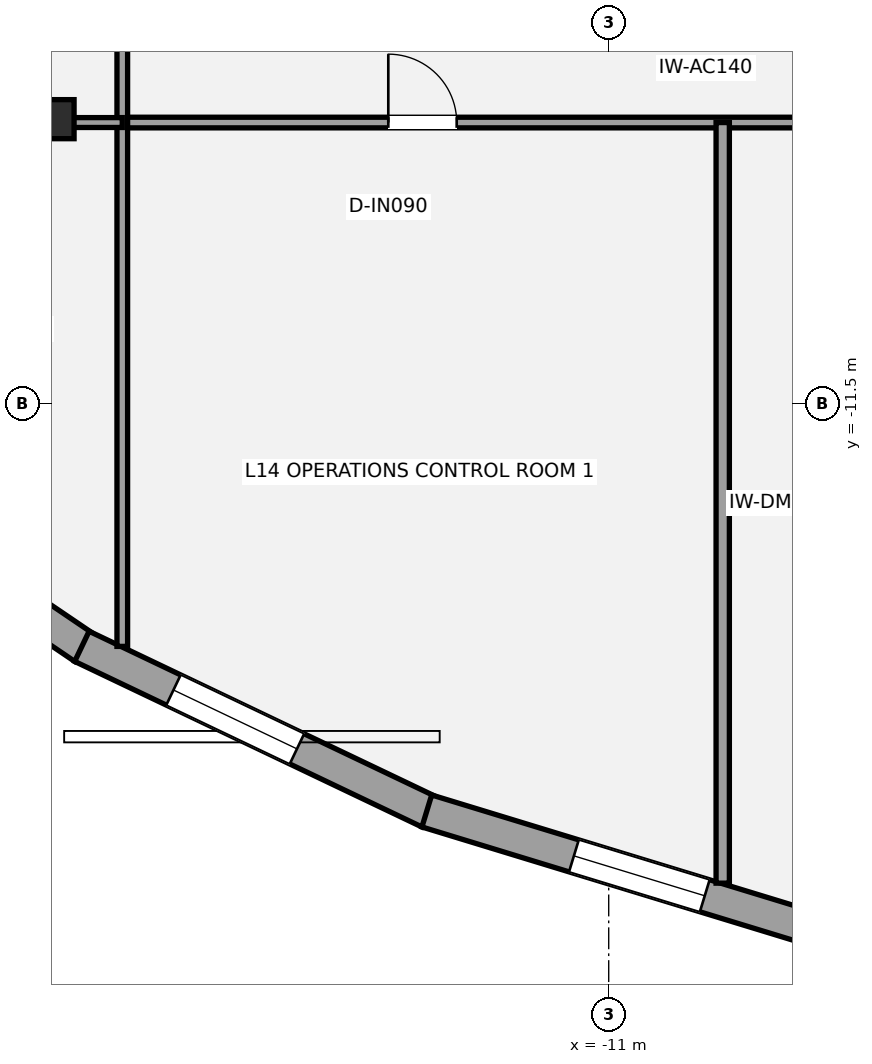
"""IFC4 building model, lengths in metres.
Left out: names, types, materials, properties, quantities, classifications, styles, units other than length and angle.
Written with IfcOpenShell. Run it as: python <this file> out.ifc"""

import sys

from ifc_helpers import new_model, si_unit, direction, frame, frame_2d, origin, origin_2d, place, context, subcontext, project, spatial, rectangle, i_section, extrude, element, fill, save


model = new_model("IFC4")
c1 = context("Model", 3, precision=1e-05, world=origin(), true_north=direction((0.0, 1.0)))
c2 = subcontext(c1, "Body", "Model", "MODEL_VIEW")
j1 = project(units=[si_unit("LENGTHUNIT", "METRE"), si_unit("PLANEANGLEUNIT", "RADIAN")], contexts=[c1])
p1 = place(None, origin())
s1 = spatial("IfcSite", under=j1, at=p1, CompositionType="ELEMENT")
p2 = place(p1, origin())
s2 = spatial("IfcBuilding", under=s1, at=p2, CompositionType="ELEMENT")
p3 = place(p2, frame((0.0, 0.0, 55.8)))
s3 = spatial("IfcBuildingStorey", under=s2, at=p3, CompositionType="ELEMENT", Elevation=55.8)
p4 = place(p3, frame((-18.253, -7.756, 0.0), z_axis=(0.0, 0.0, 1.0), x_axis=(1.0, 0.0, 0.0)))
e1 = element("IfcColumn", 1, at=p4, inside=s3, PredefinedType="COLUMN", context=c2, shape_type="SweptSolid", body=[
    extrude(i_section(OverallWidth=0.437, OverallDepth=0.514, WebThickness=0.061, FlangeThickness=0.097, at=origin_2d()), origin(), (0.0, 0.0, 1.0), 3.6),
])
p5 = place(p3, frame((-17.903, -14.708, 0.0), z_axis=(0.0, 0.0, 1.0), x_axis=(-0.827723442454, 0.561136260468, 0.0)))
e2 = element("IfcWall", 2, at=p5, inside=s3, PredefinedType="STANDARD", context=c2, shape_type="SweptSolid", body=[
    extrude(rectangle(XDim=4.759, YDim=0.44, at=frame_2d((2.379, 0.0))), origin(), (0.0, 0.0, 1.0), 2.529),
])
p6 = place(p5, frame((1.086, 0.0, 0.65)))
e3 = element("IfcOpeningElement", 3, at=p6, cuts=e2, PredefinedType="OPENING", context=c2, shape_type="SweptSolid", body=[
    extrude(rectangle(XDim=1.8, YDim=1.7, at=frame_2d((0.9, 0.85))), frame((0.0, 0.23, 0.0), z_axis=(0.0, -1.0, 0.0), x_axis=(1.0, 0.0, 0.0)), (0.0, 0.0, 1.0), 0.46),
])
p7 = place(p3, frame((-13.363, -16.869, 0.0), z_axis=(0.0, 0.0, 1.0), x_axis=(-0.902682101727, 0.430308056189, 0.0)))
e4 = element("IfcWall", 4, at=p7, inside=s3, PredefinedType="STANDARD", context=c2, shape_type="SweptSolid", body=[
    extrude(rectangle(XDim=5.061, YDim=0.44, at=frame_2d((2.53, 0.0))), origin(), (0.0, 0.0, 1.0), 2.529),
])
p8 = place(p7, frame((1.927, 0.0, 0.65)))
e5 = element("IfcOpeningElement", 5, at=p8, cuts=e4, PredefinedType="OPENING", context=c2, shape_type="SweptSolid", body=[
    extrude(rectangle(XDim=1.8, YDim=1.7, at=frame_2d((0.9, 0.85))), frame((0.0, 0.23, 0.0), z_axis=(0.0, -1.0, 0.0), x_axis=(1.0, 0.0, 0.0)), (0.0, 0.0, 1.0), 0.46),
])
p9 = place(p3, frame((-8.272, -18.42, 0.0), z_axis=(0.0, 0.0, 1.0), x_axis=(-0.956466543593, 0.291841996615, 0.0)))
e6 = element("IfcWall", 6, at=p9, inside=s3, PredefinedType="STANDARD", context=c2, shape_type="SweptSolid", body=[
    extrude(rectangle(XDim=5.354, YDim=0.44, at=frame_2d((2.677, 0.0))), origin(), (0.0, 0.0, 1.0), 2.529),
])
p10 = place(p9, frame((1.531, 0.0, 0.65)))
e7 = element("IfcOpeningElement", 7, at=p10, cuts=e6, PredefinedType="OPENING", context=c2, shape_type="SweptSolid", body=[
    extrude(rectangle(XDim=1.8, YDim=1.7, at=frame_2d((0.9, 0.85))), frame((0.0, 0.23, 0.0), z_axis=(0.0, -1.0, 0.0), x_axis=(1.0, 0.0, 0.0)), (0.0, 0.0, 1.0), 0.46),
])
p11 = place(p3, frame((-17.4, -7.8, 0.0), z_axis=(0.0, 0.0, 1.0), x_axis=(1.0, 0.0, 0.0)))
e8 = element("IfcWall", 8, at=p11, inside=s3, PredefinedType="PARTITIONING", context=c2, shape_type="SweptSolid", body=[
    extrude(rectangle(XDim=34.8, YDim=0.14, at=frame_2d((17.4, 0.0))), origin(), (0.0, 0.0, 1.0), 2.779),
])
p12 = place(p11, frame((3.5, 0.0, 0.0)))
e9 = element("IfcOpeningElement", 9, at=p12, cuts=e8, PredefinedType="OPENING", context=c2, shape_type="SweptSolid", body=[
    extrude(rectangle(XDim=0.9, YDim=2.1, at=frame_2d((0.45, 1.05))), frame((0.0, 0.08, 0.0), z_axis=(0.0, -1.0, 0.0), x_axis=(1.0, 0.0, 0.0)), (0.0, 0.0, 1.0), 0.16),
])
p13 = place(p11, frame((10.95, 0.0, 0.0)))
e10 = element("IfcOpeningElement", 10, at=p13, cuts=e8, PredefinedType="OPENING", context=c2, shape_type="SweptSolid", body=[
    extrude(rectangle(XDim=0.9, YDim=2.1, at=frame_2d((0.45, 1.05))), frame((0.0, 0.08, 0.0), z_axis=(0.0, -1.0, 0.0), x_axis=(1.0, 0.0, 0.0)), (0.0, 0.0, 1.0), 0.16),
])
p14 = place(p11, frame((17.95, 0.0, 0.0)))
e11 = element("IfcOpeningElement", 11, at=p14, cuts=e8, PredefinedType="OPENING", context=c2, shape_type="SweptSolid", body=[
    extrude(rectangle(XDim=0.9, YDim=2.1, at=frame_2d((0.45, 1.05))), frame((0.0, 0.08, 0.0), z_axis=(0.0, -1.0, 0.0), x_axis=(1.0, 0.0, 0.0)), (0.0, 0.0, 1.0), 0.16),
])
p15 = place(p11, frame((24.45, 0.0, 0.0)))
e12 = element("IfcOpeningElement", 12, at=p15, cuts=e8, PredefinedType="OPENING", context=c2, shape_type="SweptSolid", body=[
    extrude(rectangle(XDim=0.9, YDim=2.1, at=frame_2d((0.45, 1.05))), frame((0.0, 0.08, 0.0), z_axis=(0.0, -1.0, 0.0), x_axis=(1.0, 0.0, 0.0)), (0.0, 0.0, 1.0), 0.16),
])
p16 = place(p11, frame((30.9, 0.0, 0.0)))
e13 = element("IfcOpeningElement", 13, at=p16, cuts=e8, PredefinedType="OPENING", context=c2, shape_type="SweptSolid", body=[
    extrude(rectangle(XDim=0.9, YDim=2.1, at=frame_2d((0.45, 1.05))), frame((0.0, 0.08, 0.0), z_axis=(0.0, -1.0, 0.0), x_axis=(1.0, 0.0, 0.0)), (0.0, 0.0, 1.0), 0.16),
])
p17 = place(p3, frame((-17.4, -14.692, 0.0), z_axis=(0.0, 0.0, 1.0), x_axis=(0.0, 1.0, 0.0)))
e14 = element("IfcWall", 14, at=p17, inside=s3, PredefinedType="PARTITIONING", context=c2, shape_type="SweptSolid", body=[
    extrude(rectangle(XDim=20.542, YDim=0.14, at=frame_2d((10.271, 0.0))), origin(), (0.0, 0.0, 1.0), 2.841),
])
p18 = place(p17, frame((9.841, 0.0, 0.0)))
e15 = element("IfcOpeningElement", 15, at=p18, cuts=e14, PredefinedType="OPENING", context=c2, shape_type="SweptSolid", body=[
    extrude(rectangle(XDim=0.9, YDim=2.1, at=frame_2d((0.45, 1.05))), frame((0.0, 0.08, 0.0), z_axis=(0.0, -1.0, 0.0), x_axis=(1.0, 0.0, 0.0)), (0.0, 0.0, 1.0), 0.16),
])
p19 = place(p17, frame((16.667, 0.0, 0.0)))
e16 = element("IfcOpeningElement", 16, at=p19, cuts=e14, PredefinedType="OPENING", context=c2, shape_type="SweptSolid", body=[
    extrude(rectangle(XDim=0.9, YDim=2.1, at=frame_2d((0.45, 1.05))), frame((0.0, 0.08, 0.0), z_axis=(0.0, -1.0, 0.0), x_axis=(1.0, 0.0, 0.0)), (0.0, 0.0, 1.0), 0.16),
])
p20 = place(p3, frame((-9.5, -17.807, 0.0), z_axis=(0.0, 0.0, 1.0), x_axis=(0.0, 1.0, 0.0)))
e17 = element("IfcWall", 17, at=p20, inside=s3, PredefinedType="PARTITIONING", context=c2, shape_type="SweptSolid", body=[
    extrude(rectangle(XDim=10.007, YDim=0.175, at=frame_2d((5.003, 0.0))), origin(), (0.0, 0.0, 1.0), 2.853),
])
p21 = place(p3, frame((-25.518, -7.8, 0.0), z_axis=(0.0, 0.0, 1.0), x_axis=(1.0, 0.0, 0.0)))
e18 = element("IfcWall", 18, at=p21, inside=s3, PredefinedType="PARTITIONING", context=c2, shape_type="SweptSolid", body=[
    extrude(rectangle(XDim=8.118, YDim=0.13, at=frame_2d((4.059, 0.0))), origin(), (0.0, 0.0, 1.0), 2.779),
])
p22 = place(p21, frame((0.63, 0.0, 0.0)))
e19 = element("IfcOpeningElement", 19, at=p22, cuts=e18, PredefinedType="OPENING", context=c2, shape_type="SweptSolid", body=[
    extrude(rectangle(XDim=0.9, YDim=2.1, at=frame_2d((0.45, 1.05))), frame((0.0, 0.075, 0.0), z_axis=(0.0, -1.0, 0.0), x_axis=(1.0, 0.0, 0.0)), (0.0, 0.0, 1.0), 0.15),
])
p23 = place(p8, origin())
e20 = element("IfcWindow", 20, at=p23, inside=s3, PartitioningType="SINGLE_PANEL", PredefinedType="WINDOW", context=c2, shape_type="SweptSolid", body=[
    extrude(rectangle(XDim=1.8, YDim=1.7, at=frame_2d((0.9, 0.85))), frame((0.0, -0.01, 0.0), z_axis=(0.0, -1.0, 0.0), x_axis=(1.0, 0.0, 0.0)), (0.0, 0.0, 1.0), 0.06),
])
fill(e5, e20)
p24 = place(p10, origin())
e21 = element("IfcWindow", 21, at=p24, inside=s3, PartitioningType="SINGLE_PANEL", PredefinedType="WINDOW", context=c2, shape_type="SweptSolid", body=[
    extrude(rectangle(XDim=1.8, YDim=1.7, at=frame_2d((0.9, 0.85))), frame((0.0, -0.01, 0.0), z_axis=(0.0, -1.0, 0.0), x_axis=(1.0, 0.0, 0.0)), (0.0, 0.0, 1.0), 0.06),
])
fill(e7, e21)
p25 = place(p12, origin())
e22 = element("IfcDoor", 22, at=p25, inside=s3, OperationType="SINGLE_SWING_LEFT", PredefinedType="DOOR", context=c2, shape_type="SweptSolid", body=[
    extrude(rectangle(XDim=0.9, YDim=2.1, at=frame_2d((0.45, 1.05))), frame((0.0, 0.025, 0.0), z_axis=(0.0, -1.0, 0.0), x_axis=(1.0, 0.0, 0.0)), (0.0, 0.0, 1.0), 0.05),
])
fill(e9, e22)
save(model, sys.argv[1])
